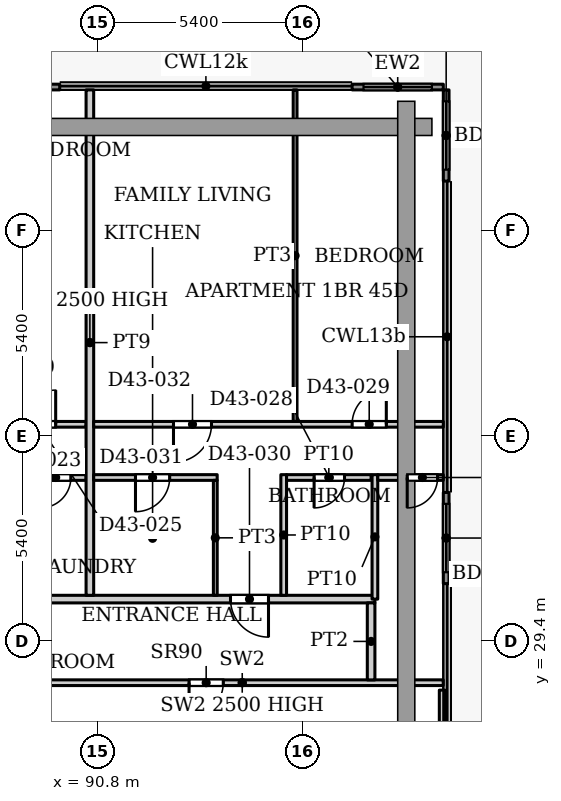
"""IFC4 building model, lengths in metres.
Left out: names, types, materials, properties, quantities, classifications, styles, units other than length and angle.
Written with IfcOpenShell. Run it as: python <this file> out.ifc"""

import sys

from ifc_helpers import new_model, si_unit, direction, frame, frame_2d, origin, place, context, subcontext, project, spatial, rectangle, extrude, source, transform, mapped, element, fill, save


model = new_model("IFC4")
c1 = context("Model", 3, precision=1e-05, world=origin(), true_north=direction((0.0, 1.0)))
c2 = subcontext(c1, "Body", "Model", "MODEL_VIEW")
j1 = project(units=[si_unit("LENGTHUNIT", "METRE"), si_unit("PLANEANGLEUNIT", "RADIAN")], contexts=[c1])
p1 = place(None, origin())
s1 = spatial("IfcSite", under=j1, at=p1, CompositionType="ELEMENT")
p2 = place(p1, origin())
s2 = spatial("IfcBuilding", under=s1, at=p2, CompositionType="ELEMENT")
p3 = place(p2, frame((0.0, 0.0, 191.6)))
s3 = spatial("IfcBuildingStorey", under=s2, at=p3, CompositionType="ELEMENT", Elevation=191.6)
p4 = place(p3, frame((87.406, 43.975, 0.0), z_axis=(0.0, 0.0, 1.0), x_axis=(1.0, 0.0, 0.0)))
e1 = element("IfcWall", 1, at=p4, inside=s3, PredefinedType="SOLIDWALL", context=c2, shape_type="SweptSolid", body=[
    extrude(rectangle(XDim=2.4, YDim=0.15, at=frame_2d((1.2, 0.0))), origin(), (0.0, 0.0, 1.0), 3.75),
])
p5 = place(p4, frame((0.3, 0.0, 0.0)))
e2 = element("IfcOpeningElement", 2, at=p5, cuts=e1, PredefinedType="OPENING", context=c2, shape_type="SweptSolid", body=[
    extrude(rectangle(XDim=1.8, YDim=2.4, at=frame_2d((0.9, 1.2))), frame((0.0, 0.085, 0.0), z_axis=(0.0, -1.0, 0.0), x_axis=(1.0, 0.0, 0.0)), (0.0, 0.0, 1.0), 0.17),
])
p6 = place(p3, frame((97.5, 43.975, 0.0), z_axis=(0.0, 0.0, 1.0), x_axis=(1.0, 0.0, 0.0)))
e3 = element("IfcWall", 3, at=p6, inside=s3, PredefinedType="SOLIDWALL", context=c2, shape_type="SweptSolid", body=[
    extrude(rectangle(XDim=2.4, YDim=0.15, at=frame_2d((1.2, 0.0))), origin(), (0.0, 0.0, 1.0), 3.75),
])
p7 = place(p6, frame((0.3, 0.0, 0.0)))
e4 = element("IfcOpeningElement", 4, at=p7, cuts=e3, PredefinedType="OPENING", context=c2, shape_type="SweptSolid", body=[
    extrude(rectangle(XDim=1.8, YDim=2.4, at=frame_2d((0.9, 1.2))), frame((0.0, 0.085, 0.0), z_axis=(0.0, -1.0, 0.0), x_axis=(1.0, 0.0, 0.0)), (0.0, 0.0, 1.0), 0.17),
])
p8 = place(p3, frame((99.975, 43.9, 0.0), z_axis=(0.0, 0.0, 1.0), x_axis=(0.0, -1.0, 0.0)))
e5 = element("IfcWall", 5, at=p8, inside=s3, PredefinedType="SOLIDWALL", context=c2, shape_type="SweptSolid", body=[
    extrude(rectangle(XDim=2.4, YDim=0.15, at=frame_2d((1.2, 0.0))), origin(), (0.0, 0.0, 1.0), 3.75),
])
p9 = place(p8, frame((0.3, 0.0, 0.0)))
e6 = element("IfcOpeningElement", 6, at=p9, cuts=e5, PredefinedType="OPENING", context=c2, shape_type="SweptSolid", body=[
    extrude(rectangle(XDim=1.8, YDim=2.4, at=frame_2d((0.9, 1.2))), frame((0.0, 0.085, 0.0), z_axis=(0.0, -1.0, 0.0), x_axis=(1.0, 0.0, 0.0)), (0.0, 0.0, 1.0), 0.17),
])
p10 = place(p3, frame((99.975, 33.307, 0.0), z_axis=(0.0, 0.0, 1.0), x_axis=(0.0, -1.0, 0.0)))
e7 = element("IfcWall", 7, at=p10, inside=s3, PredefinedType="SOLIDWALL", context=c2, shape_type="SweptSolid", body=[
    extrude(rectangle(XDim=2.4, YDim=0.15, at=frame_2d((1.2, 0.0))), origin(), (0.0, 0.0, 1.0), 3.75),
])
p11 = place(p10, frame((0.3, 0.0, 0.0)))
e8 = element("IfcOpeningElement", 8, at=p11, cuts=e7, PredefinedType="OPENING", context=c2, shape_type="SweptSolid", body=[
    extrude(rectangle(XDim=1.8, YDim=2.4, at=frame_2d((0.9, 1.2))), frame((0.0, 0.085, 0.0), z_axis=(0.0, -1.0, 0.0), x_axis=(1.0, 0.0, 0.0)), (0.0, 0.0, 1.0), 0.17),
])
p12 = place(p3, frame((89.32, 28.3, 0.0), z_axis=(0.0, 0.0, 1.0), x_axis=(1.0, 0.0, 0.0)))
e9 = element("IfcWall", 9, at=p12, inside=s3, PredefinedType="PARTITIONING", context=c2, shape_type="SweptSolid", body=[
    extrude(rectangle(XDim=10.578, YDim=0.15, at=frame_2d((5.289, 0.0))), origin(), (0.0, 0.0, 1.0), 2.5),
])
p13 = place(p12, frame((3.89, 0.0, 0.0)))
e10 = element("IfcOpeningElement", 10, at=p13, cuts=e9, PredefinedType="OPENING", context=c2, shape_type="SweptSolid", body=[
    extrude(rectangle(XDim=0.9, YDim=2.2, at=frame_2d((0.45, 1.1))), frame((0.0, 0.085, 0.0), z_axis=(0.0, -1.0, 0.0), x_axis=(1.0, 0.0, 0.0)), (0.0, 0.0, 1.0), 0.17),
])
p14 = place(p3, frame((99.87, 21.015, 0.0), z_axis=(0.0, 0.0, 1.0), x_axis=(0.0, 1.0, 0.0)))
e11 = element("IfcWall", 11, at=p14, inside=s3, PredefinedType="PARTITIONING", context=c2, shape_type="SweptSolid", body=[
    extrude(rectangle(XDim=7.09, YDim=0.15, at=frame_2d((3.545, 0.0))), origin(), (0.0, 0.0, 1.0), 3.9),
])
p15 = place(p3, frame((53.549, 30.5, 0.0), z_axis=(0.0, 0.0, 1.0), x_axis=(1.0, 0.0, 0.0)))
e12 = element("IfcWall", 12, at=p15, inside=s3, PredefinedType="PARTITIONING", context=c2, shape_type="SweptSolid", body=[
    extrude(rectangle(XDim=44.551, YDim=0.2, at=frame_2d((22.275, 0.0))), origin(), (0.0, 0.0, 1.0), 3.6),
])
p16 = place(p15, frame((8.351, 0.0, 0.0)))
e13 = element("IfcOpeningElement", 13, at=p16, cuts=e12, PredefinedType="OPENING", context=c2, shape_type="SweptSolid", body=[
    extrude(rectangle(XDim=1.0, YDim=2.1, at=frame_2d((0.5, 1.05))), frame((0.0, 0.11, 0.0), z_axis=(0.0, -1.0, 0.0), x_axis=(1.0, 0.0, 0.0)), (0.0, 0.0, 1.0), 0.22),
])
p17 = place(p15, frame((12.551, 0.0, 0.0)))
e14 = element("IfcOpeningElement", 14, at=p17, cuts=e12, PredefinedType="OPENING", context=c2, shape_type="SweptSolid", body=[
    extrude(rectangle(XDim=1.0, YDim=2.1, at=frame_2d((0.5, 1.05))), frame((0.0, 0.11, 0.0), z_axis=(0.0, -1.0, 0.0), x_axis=(1.0, 0.0, 0.0)), (0.0, 0.0, 1.0), 0.22),
])
p18 = place(p15, frame((28.751, 0.0, 0.0)))
e15 = element("IfcOpeningElement", 15, at=p18, cuts=e12, PredefinedType="OPENING", context=c2, shape_type="SweptSolid", body=[
    extrude(rectangle(XDim=1.0, YDim=2.1, at=frame_2d((0.5, 1.05))), frame((0.0, 0.11, 0.0), z_axis=(0.0, -1.0, 0.0), x_axis=(1.0, 0.0, 0.0)), (0.0, 0.0, 1.0), 0.22),
])
p19 = place(p15, frame((40.751, 0.0, 0.0)))
e16 = element("IfcOpeningElement", 16, at=p19, cuts=e12, PredefinedType="OPENING", context=c2, shape_type="SweptSolid", body=[
    extrude(rectangle(XDim=1.0, YDim=2.1, at=frame_2d((0.5, 1.05))), frame((0.0, 0.11, 0.0), z_axis=(0.0, -1.0, 0.0), x_axis=(1.0, 0.0, 0.0)), (0.0, 0.0, 1.0), 0.22),
])
p20 = place(p3, frame((79.0, 35.1, 0.0), z_axis=(0.0, 0.0, 1.0), x_axis=(1.0, 0.0, 0.0)))
e17 = element("IfcWall", 17, at=p20, inside=s3, PredefinedType="PARTITIONING", context=c2, shape_type="SweptSolid", body=[
    extrude(rectangle(XDim=11.5, YDim=0.15, at=frame_2d((5.75, 0.0))), origin(), (0.0, 0.0, 1.0), 3.6),
])
p21 = place(p20, frame((0.95, 0.0, 0.0)))
e18 = element("IfcOpeningElement", 18, at=p21, cuts=e17, PredefinedType="OPENING", context=c2, shape_type="SweptSolid", body=[
    extrude(rectangle(XDim=0.9, YDim=2.1, at=frame_2d((0.45, 1.05))), frame((0.0, 0.085, 0.0), z_axis=(0.0, -1.0, 0.0), x_axis=(1.0, 0.0, 0.0)), (0.0, 0.0, 1.0), 0.17),
])
p22 = place(p20, frame((4.35, 0.0, 0.0)))
e19 = element("IfcOpeningElement", 19, at=p22, cuts=e17, PredefinedType="OPENING", context=c2, shape_type="SweptSolid", body=[
    extrude(rectangle(XDim=1.0, YDim=2.1, at=frame_2d((0.5, 1.05))), frame((0.0, 0.085, 0.0), z_axis=(0.0, -1.0, 0.0), x_axis=(1.0, 0.0, 0.0)), (0.0, 0.0, 1.0), 0.17),
])
p23 = place(p20, frame((9.8, 0.0, 0.0)))
e20 = element("IfcOpeningElement", 20, at=p23, cuts=e17, PredefinedType="OPENING", context=c2, shape_type="SweptSolid", body=[
    extrude(rectangle(XDim=0.9, YDim=2.1, at=frame_2d((0.45, 1.05))), frame((0.0, 0.085, 0.0), z_axis=(0.0, -1.0, 0.0), x_axis=(1.0, 0.0, 0.0)), (0.0, 0.0, 1.0), 0.17),
])
p24 = place(p3, frame((83.625, 33.7, 0.0), z_axis=(0.0, 0.0, 1.0), x_axis=(1.0, 0.0, 0.0)))
e21 = element("IfcWall", 21, at=p24, inside=s3, PredefinedType="PARTITIONING", context=c2, shape_type="SweptSolid", body=[
    extrude(rectangle(XDim=6.875, YDim=0.15, at=frame_2d((3.438, 0.0))), origin(), (0.0, 0.0, 1.0), 3.6),
])
p25 = place(p24, frame((3.725, 0.0, 0.0)))
e22 = element("IfcOpeningElement", 22, at=p25, cuts=e21, PredefinedType="OPENING", context=c2, shape_type="SweptSolid", body=[
    extrude(rectangle(XDim=0.8, YDim=2.1, at=frame_2d((0.4, 1.05))), frame((0.0, 0.085, 0.0), z_axis=(0.0, -1.0, 0.0), x_axis=(1.0, 0.0, 0.0)), (0.0, 0.0, 1.0), 0.17),
])
p26 = place(p24, frame((5.675, 0.0, 0.0)))
e23 = element("IfcOpeningElement", 23, at=p26, cuts=e21, PredefinedType="OPENING", context=c2, shape_type="SweptSolid", body=[
    extrude(rectangle(XDim=0.8, YDim=2.1, at=frame_2d((0.4, 1.05))), frame((0.0, 0.085, 0.0), z_axis=(0.0, -1.0, 0.0), x_axis=(1.0, 0.0, 0.0)), (0.0, 0.0, 1.0), 0.17),
])
p27 = place(p24, frame((1.925, 0.0, 0.0)))
e24 = element("IfcOpeningElement", 24, at=p27, cuts=e21, PredefinedType="OPENING", context=c2, shape_type="SweptSolid", body=[
    extrude(rectangle(XDim=0.8, YDim=2.1, at=frame_2d((0.4, 1.05))), frame((0.0, 0.085, 0.0), z_axis=(0.0, -1.0, 0.0), x_axis=(1.0, 0.0, 0.0)), (0.0, 0.0, 1.0), 0.17),
])
p28 = place(p24, frame((0.425, 0.0, 0.0)))
e25 = element("IfcOpeningElement", 25, at=p28, cuts=e21, PredefinedType="OPENING", context=c2, shape_type="SweptSolid", body=[
    extrude(rectangle(XDim=0.8, YDim=2.1, at=frame_2d((0.4, 1.05))), frame((0.0, 0.085, 0.0), z_axis=(0.0, -1.0, 0.0), x_axis=(1.0, 0.0, 0.0)), (0.0, 0.0, 1.0), 0.17),
])
p29 = place(p3, frame((90.6, 30.6, 0.0), z_axis=(0.0, 0.0, 1.0), x_axis=(0.0, 1.0, 0.0)))
e26 = element("IfcWall", 26, at=p29, inside=s3, PredefinedType="PARTITIONING", context=c2, shape_type="SweptSolid", body=[
    extrude(rectangle(XDim=13.3, YDim=0.2, at=frame_2d((6.65, 0.0))), origin(), (0.0, 0.0, 1.0), 2.5),
])
p30 = place(p3, frame((90.7, 33.7, 0.0), z_axis=(0.0, 0.0, 1.0), x_axis=(1.0, 0.0, 0.0)))
e27 = element("IfcWall", 27, at=p30, inside=s3, PredefinedType="PARTITIONING", context=c2, shape_type="SweptSolid", body=[
    extrude(rectangle(XDim=3.25, YDim=0.15, at=frame_2d((1.625, 0.0))), origin(), (0.0, 0.0, 1.0), 3.6),
])
p31 = place(p30, frame((1.1, 0.0, 0.0)))
e28 = element("IfcOpeningElement", 28, at=p31, cuts=e27, PredefinedType="OPENING", context=c2, shape_type="SweptSolid", body=[
    extrude(rectangle(XDim=0.9, YDim=2.1, at=frame_2d((0.45, 1.05))), frame((0.0, 0.085, 0.0), z_axis=(0.0, -1.0, 0.0), x_axis=(1.0, 0.0, 0.0)), (0.0, 0.0, 1.0), 0.17),
])
p32 = place(p3, frame((90.7, 35.1, 0.0), z_axis=(0.0, 0.0, 1.0), x_axis=(1.0, 0.0, 0.0)))
e29 = element("IfcWall", 29, at=p32, inside=s3, PredefinedType="PARTITIONING", context=c2, shape_type="SweptSolid", body=[
    extrude(rectangle(XDim=9.2, YDim=0.15, at=frame_2d((4.6, 0.0))), origin(), (0.0, 0.0, 1.0), 3.6),
])
p33 = place(p32, frame((6.8, 0.0, 0.0)))
e30 = element("IfcOpeningElement", 30, at=p33, cuts=e29, PredefinedType="OPENING", context=c2, shape_type="SweptSolid", body=[
    extrude(rectangle(XDim=0.9, YDim=2.1, at=frame_2d((0.45, 1.05))), frame((0.0, 0.085, 0.0), z_axis=(0.0, -1.0, 0.0), x_axis=(1.0, 0.0, 0.0)), (0.0, 0.0, 1.0), 0.17),
])
p34 = place(p32, frame((2.1, 0.0, 0.0)))
e31 = element("IfcOpeningElement", 31, at=p34, cuts=e29, PredefinedType="OPENING", context=c2, shape_type="SweptSolid", body=[
    extrude(rectangle(XDim=1.0, YDim=2.1, at=frame_2d((0.5, 1.05))), frame((0.0, 0.085, 0.0), z_axis=(0.0, -1.0, 0.0), x_axis=(1.0, 0.0, 0.0)), (0.0, 0.0, 1.0), 0.17),
])
p35 = place(p3, frame((93.9, 30.6, 0.0), z_axis=(0.0, 0.0, 1.0), x_axis=(0.0, 1.0, 0.0)))
e32 = element("IfcWall", 32, at=p35, inside=s3, PredefinedType="PARTITIONING", context=c2, shape_type="SweptSolid", body=[
    extrude(rectangle(XDim=3.025, YDim=0.1, at=frame_2d((1.512, 0.0))), origin(), (0.0, 0.0, 1.0), 3.6),
])
p36 = place(p3, frame((95.7, 30.6, 0.0), z_axis=(0.0, 0.0, 1.0), x_axis=(0.0, 1.0, 0.0)))
e33 = element("IfcWall", 33, at=p36, inside=s3, PredefinedType="PARTITIONING", context=c2, shape_type="SweptSolid", body=[
    extrude(rectangle(XDim=3.175, YDim=0.15, at=frame_2d((1.587, 0.0))), origin(), (0.0, 0.0, 1.0), 3.6),
])
p37 = place(p3, frame((95.775, 33.7, 0.0), z_axis=(0.0, 0.0, 1.0), x_axis=(1.0, 0.0, 0.0)))
e34 = element("IfcWall", 34, at=p37, inside=s3, PredefinedType="PARTITIONING", context=c2, shape_type="SweptSolid", body=[
    extrude(rectangle(XDim=2.225, YDim=0.15, at=frame_2d((1.113, 0.0))), origin(), (0.0, 0.0, 1.0), 3.6),
])
p38 = place(p37, frame((0.725, 0.0, 0.0)))
e35 = element("IfcOpeningElement", 35, at=p38, cuts=e34, PredefinedType="OPENING", context=c2, shape_type="SweptSolid", body=[
    extrude(rectangle(XDim=0.8, YDim=2.1, at=frame_2d((0.4, 1.05))), frame((0.0, 0.085, 0.0), z_axis=(0.0, -1.0, 0.0), x_axis=(1.0, 0.0, 0.0)), (0.0, 0.0, 1.0), 0.17),
])
p39 = place(p3, frame((96.0, 35.175, 0.0), z_axis=(0.0, 0.0, 1.0), x_axis=(0.0, 1.0, 0.0)))
e36 = element("IfcWall", 36, at=p39, inside=s3, PredefinedType="PARTITIONING", context=c2, shape_type="SweptSolid", body=[
    extrude(rectangle(XDim=8.725, YDim=0.1, at=frame_2d((4.362, 0.0))), origin(), (0.0, 0.0, 1.0), 3.6),
])
p40 = place(p3, frame((98.0, 28.374, 0.0), z_axis=(0.0, 0.0, 1.0), x_axis=(0.0, 1.0, 0.0)))
e37 = element("IfcWall", 37, at=p40, inside=s3, PredefinedType="PARTITIONING", context=c2, shape_type="SweptSolid", body=[
    extrude(rectangle(XDim=2.026, YDim=0.2, at=frame_2d((1.013, 0.0))), origin(), (0.0, 0.0, 1.0), 3.6),
])
p41 = place(p3, frame((98.1, 30.5, 0.0), z_axis=(0.0, 0.0, 1.0), x_axis=(0.0, 1.0, 0.0)))
e38 = element("IfcWall", 38, at=p41, inside=s3, PredefinedType="PARTITIONING", context=c2, shape_type="SweptSolid", body=[
    extrude(rectangle(XDim=3.275, YDim=0.15, at=frame_2d((1.637, 0.0))), origin(), (0.0, 0.0, 1.0), 3.6),
])
p42 = place(p3, frame((98.175, 33.7, 0.0), z_axis=(0.0, 0.0, 1.0), x_axis=(1.0, 0.0, 0.0)))
e39 = element("IfcWall", 39, at=p42, inside=s3, PredefinedType="PARTITIONING", context=c2, shape_type="SweptSolid", body=[
    extrude(rectangle(XDim=1.725, YDim=0.15, at=frame_2d((0.862, 0.0))), origin(), (0.0, 0.0, 1.0), 3.6),
])
p43 = place(p42, frame((0.775, 0.0, 0.0)))
e40 = element("IfcOpeningElement", 40, at=p43, cuts=e39, PredefinedType="OPENING", context=c2, shape_type="SweptSolid", body=[
    extrude(rectangle(XDim=0.8, YDim=2.1, at=frame_2d((0.4, 1.05))), frame((0.0, 0.085, 0.0), z_axis=(0.0, -1.0, 0.0), x_axis=(1.0, 0.0, 0.0)), (0.0, 0.0, 1.0), 0.17),
])
m1 = source(origin(), c2, "Body", "SweptSolid", [
    extrude(rectangle(XDim=1.8, YDim=2.4, at=frame_2d((0.9, 1.2))), frame((0.0, 0.025, 0.0), z_axis=(0.0, -1.0, 0.0), x_axis=(1.0, 0.0, 0.0)), (0.0, 0.0, 1.0), 0.05),
])
p44 = place(p7, origin())
e41 = element("IfcDoor", 41, at=p44, inside=s3, OperationType="SLIDING_TO_LEFT", PredefinedType="DOOR", context=c2, shape_type="MappedRepresentation", body=[
    mapped(m1, transform((0.0, 0.0, 0.0), x_axis=(1.0, 0.0, 0.0), y_axis=(0.0, 1.0, 0.0), z_axis=(0.0, 0.0, 1.0), scale=1.0)),
])
fill(e4, e41)
p45 = place(p9, origin())
e42 = element("IfcDoor", 42, at=p45, inside=s3, OperationType="SLIDING_TO_LEFT", PredefinedType="DOOR", context=c2, shape_type="MappedRepresentation", body=[
    mapped(m1, transform((0.0, 0.0, 0.0), x_axis=(1.0, 0.0, 0.0), y_axis=(0.0, 1.0, 0.0), z_axis=(0.0, 0.0, 1.0), scale=1.0)),
])
fill(e6, e42)
p46 = place(p11, origin())
e43 = element("IfcDoor", 43, at=p46, inside=s3, OperationType="SLIDING_TO_LEFT", PredefinedType="DOOR", context=c2, shape_type="MappedRepresentation", body=[
    mapped(m1, transform((0.0, 0.0, 0.0), x_axis=(1.0, 0.0, 0.0), y_axis=(0.0, 1.0, 0.0), z_axis=(0.0, 0.0, 1.0), scale=1.0)),
])
fill(e8, e43)
m2 = source(origin(), c2, "Body", "SweptSolid", [
    extrude(rectangle(XDim=0.9, YDim=2.2, at=frame_2d((0.45, 1.1))), frame((0.0, 0.025, 0.0), z_axis=(0.0, -1.0, 0.0), x_axis=(1.0, 0.0, 0.0)), (0.0, 0.0, 1.0), 0.05),
])
p47 = place(p13, origin())
e44 = element("IfcDoor", 44, at=p47, inside=s3, OperationType="SINGLE_SWING_RIGHT", PredefinedType="DOOR", context=c2, shape_type="MappedRepresentation", body=[
    mapped(m2, transform((0.0, 0.0, 0.0), x_axis=(1.0, 0.0, 0.0), y_axis=(0.0, 1.0, 0.0), z_axis=(0.0, 0.0, 1.0), scale=1.0)),
])
fill(e10, e44)
m3 = source(origin(), c2, "Body", "SweptSolid", [
    extrude(rectangle(XDim=0.8, YDim=2.1, at=frame_2d((0.4, 1.05))), frame((0.0, 0.025, 0.0), z_axis=(0.0, -1.0, 0.0), x_axis=(1.0, 0.0, 0.0)), (0.0, 0.0, 1.0), 0.05),
])
p48 = place(p26, origin())
e45 = element("IfcDoor", 45, at=p48, inside=s3, OperationType="SINGLE_SWING_RIGHT", PredefinedType="DOOR", context=c2, shape_type="MappedRepresentation", body=[
    mapped(m3, transform((0.0, 0.0, 0.0), x_axis=(1.0, 0.0, 0.0), y_axis=(0.0, 1.0, 0.0), z_axis=(0.0, 0.0, 1.0), scale=1.0)),
])
fill(e23, e45)
m4 = source(origin(), c2, "Body", "SweptSolid", [
    extrude(rectangle(XDim=0.9, YDim=2.1, at=frame_2d((0.45, 1.05))), frame((0.0, 0.025, 0.0), z_axis=(0.0, -1.0, 0.0), x_axis=(1.0, 0.0, 0.0)), (0.0, 0.0, 1.0), 0.05),
])
p49 = place(p23, origin())
e46 = element("IfcDoor", 46, at=p49, inside=s3, OperationType="SINGLE_SWING_LEFT", PredefinedType="DOOR", context=c2, shape_type="MappedRepresentation", body=[
    mapped(m4, transform((0.0, 0.0, 0.0), x_axis=(1.0, 0.0, 0.0), y_axis=(0.0, 1.0, 0.0), z_axis=(0.0, 0.0, 1.0), scale=1.0)),
])
fill(e20, e46)
p50 = place(p38, origin())
e47 = element("IfcDoor", 47, at=p50, inside=s3, OperationType="SINGLE_SWING_RIGHT", PredefinedType="DOOR", context=c2, shape_type="MappedRepresentation", body=[
    mapped(m3, transform((0.0, 0.0, 0.0), x_axis=(1.0, 0.0, 0.0), y_axis=(0.0, 1.0, 0.0), z_axis=(0.0, 0.0, 1.0), scale=1.0)),
])
fill(e35, e47)
p51 = place(p33, origin())
e48 = element("IfcDoor", 48, at=p51, inside=s3, OperationType="SINGLE_SWING_LEFT", PredefinedType="DOOR", context=c2, shape_type="MappedRepresentation", body=[
    mapped(m4, transform((0.0, 0.0, 0.0), x_axis=(1.0, 0.0, 0.0), y_axis=(0.0, 1.0, 0.0), z_axis=(0.0, 0.0, 1.0), scale=1.0)),
])
fill(e30, e48)
m5 = source(origin(), c2, "Body", "SweptSolid", [
    extrude(rectangle(XDim=1.0, YDim=2.1, at=frame_2d((0.5, 1.05))), frame((0.0, 0.025, 0.0), z_axis=(0.0, -1.0, 0.0), x_axis=(1.0, 0.0, 0.0)), (0.0, 0.0, 1.0), 0.05),
])
p52 = place(p19, origin())
e49 = element("IfcDoor", 49, at=p52, inside=s3, OperationType="SINGLE_SWING_RIGHT", PredefinedType="DOOR", context=c2, shape_type="MappedRepresentation", body=[
    mapped(m5, transform((0.0, 0.0, 0.0), x_axis=(1.0, 0.0, 0.0), y_axis=(0.0, 1.0, 0.0), z_axis=(0.0, 0.0, 1.0), scale=1.0)),
])
fill(e16, e49)
p53 = place(p31, origin())
e50 = element("IfcDoor", 50, at=p53, inside=s3, OperationType="SINGLE_SWING_RIGHT", PredefinedType="DOOR", context=c2, shape_type="MappedRepresentation", body=[
    mapped(m4, transform((0.0, 0.0, 0.0), x_axis=(1.0, 0.0, 0.0), y_axis=(0.0, 1.0, 0.0), z_axis=(0.0, 0.0, 1.0), scale=1.0)),
])
fill(e28, e50)
m6 = source(origin(), c2, "Body", "SweptSolid", [
    extrude(rectangle(XDim=1.0, YDim=2.1, at=frame_2d((0.5, 1.05))), frame((0.0, 0.025, 0.0), z_axis=(0.0, -1.0, 0.0), x_axis=(1.0, 0.0, 0.0)), (0.0, 0.0, 1.0), 0.05),
])
p54 = place(p34, origin())
e51 = element("IfcDoor", 51, at=p54, inside=s3, OperationType="SINGLE_SWING_RIGHT", PredefinedType="DOOR", context=c2, shape_type="MappedRepresentation", body=[
    mapped(m6, transform((0.0, 0.0, 0.0), x_axis=(1.0, 0.0, 0.0), y_axis=(0.0, 1.0, 0.0), z_axis=(0.0, 0.0, 1.0), scale=1.0)),
])
fill(e31, e51)
p55 = place(p43, origin())
e52 = element("IfcDoor", 52, at=p55, inside=s3, OperationType="SINGLE_SWING_RIGHT", PredefinedType="DOOR", context=c2, shape_type="MappedRepresentation", body=[
    mapped(m3, transform((0.0, 0.0, 0.0), x_axis=(1.0, 0.0, 0.0), y_axis=(0.0, 1.0, 0.0), z_axis=(0.0, 0.0, 1.0), scale=1.0)),
])
fill(e40, e52)
save(model, sys.argv[1])
